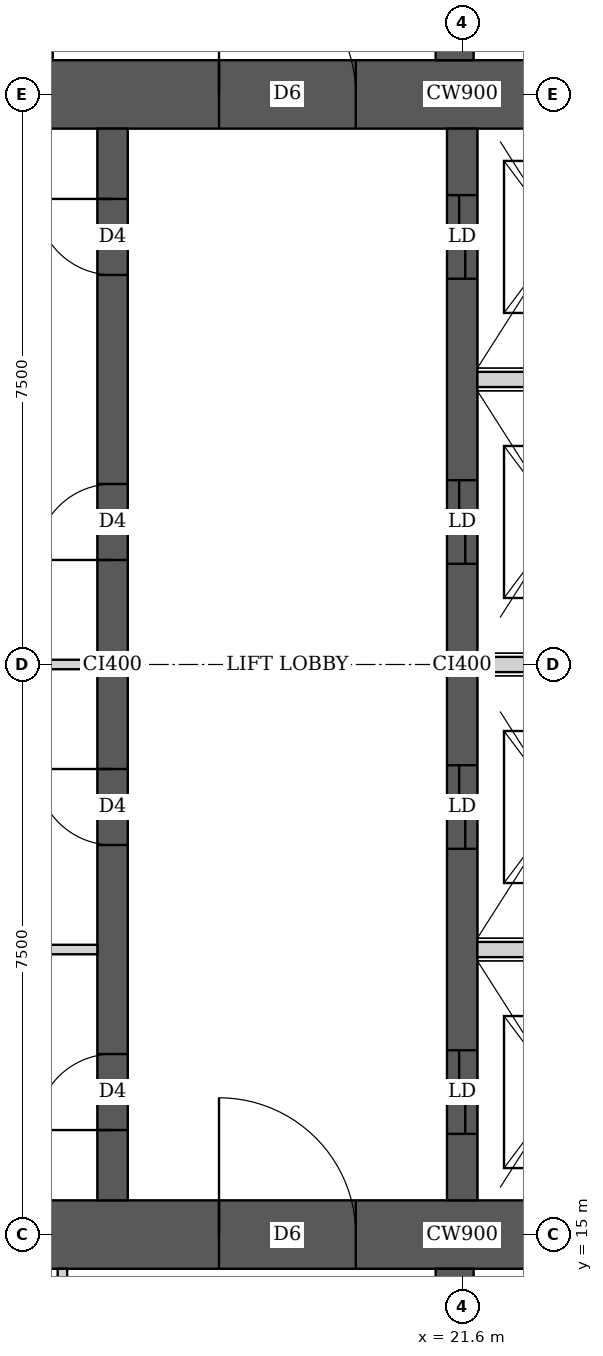
"""IFC4 building model, lengths in metres.
Left out: names, types, materials, properties, quantities, classifications, styles, units other than length and angle.
Written with IfcOpenShell. Run it as: python <this file> out.ifc"""

import sys

from ifc_helpers import new_model, si_unit, direction, frame, frame_2d, origin, place, context, subcontext, project, spatial, rectangle, extrude, element, fill, save


model = new_model("IFC4")
c1 = context("Model", 3, precision=1e-05, world=origin(), true_north=direction((0.0, 1.0)))
c2 = subcontext(c1, "Body", "Model", "MODEL_VIEW")
j1 = project(units=[si_unit("LENGTHUNIT", "METRE"), si_unit("PLANEANGLEUNIT", "RADIAN")], contexts=[c1])
p1 = place(None, origin())
s1 = spatial("IfcSite", under=j1, at=p1, CompositionType="ELEMENT")
p2 = place(p1, origin())
s2 = spatial("IfcBuilding", under=s1, at=p2, CompositionType="ELEMENT")
p3 = place(p2, frame((0.0, 0.0, 135.8)))
s3 = spatial("IfcBuildingStorey", under=s2, at=p3, CompositionType="ELEMENT", Elevation=135.8)
p4 = place(p3, frame((13.95, 15.0, 0.0), z_axis=(0.0, 0.0, 1.0), x_axis=(1.0, 0.0, 0.0)))
e1 = element("IfcWall", 1, at=p4, inside=s3, PredefinedType="SHEAR", context=c2, shape_type="SweptSolid", body=[
    extrude(rectangle(XDim=15.3, YDim=0.9, at=frame_2d((7.65, 0.0))), origin(), (0.0, 0.0, 1.0), 3.75),
])
p5 = place(p4, frame((4.45, 0.0, 0.0)))
e2 = element("IfcOpeningElement", 2, at=p5, cuts=e1, PredefinedType="OPENING", context=c2, shape_type="SweptSolid", body=[
    extrude(rectangle(XDim=1.8, YDim=2.1, at=frame_2d((0.9, 1.05))), frame((0.0, 0.46, 0.0), z_axis=(0.0, -1.0, 0.0), x_axis=(1.0, 0.0, 0.0)), (0.0, 0.0, 1.0), 0.92),
])
p6 = place(p4, frame((10.7, 0.0, 0.0)))
e3 = element("IfcOpeningElement", 3, at=p6, cuts=e1, PredefinedType="OPENING", context=c2, shape_type="SweptSolid", body=[
    extrude(rectangle(XDim=1.1, YDim=2.1, at=frame_2d((0.55, 1.05))), frame((0.0, 0.46, 0.0), z_axis=(0.0, -1.0, 0.0), x_axis=(1.0, 0.0, 0.0)), (0.0, 0.0, 1.0), 0.92),
])
p7 = place(p3, frame((13.95, 30.0, 0.0), z_axis=(0.0, 0.0, 1.0), x_axis=(1.0, 0.0, 0.0)))
e4 = element("IfcWall", 4, at=p7, inside=s3, PredefinedType="SHEAR", context=c2, shape_type="SweptSolid", body=[
    extrude(rectangle(XDim=15.3, YDim=0.9, at=frame_2d((7.65, 0.0))), origin(), (0.0, 0.0, 1.0), 3.75),
])
p8 = place(p7, frame((4.45, 0.0, 0.0)))
e5 = element("IfcOpeningElement", 5, at=p8, cuts=e4, PredefinedType="OPENING", context=c2, shape_type="SweptSolid", body=[
    extrude(rectangle(XDim=1.8, YDim=2.1, at=frame_2d((0.9, 1.05))), frame((0.0, 0.46, 0.0), z_axis=(0.0, -1.0, 0.0), x_axis=(1.0, 0.0, 0.0)), (0.0, 0.0, 1.0), 0.92),
])
p9 = place(p7, frame((10.7, 0.0, 0.0)))
e6 = element("IfcOpeningElement", 6, at=p9, cuts=e4, PredefinedType="OPENING", context=c2, shape_type="SweptSolid", body=[
    extrude(rectangle(XDim=1.1, YDim=2.1, at=frame_2d((0.55, 1.05))), frame((0.0, 0.46, 0.0), z_axis=(0.0, -1.0, 0.0), x_axis=(1.0, 0.0, 0.0)), (0.0, 0.0, 1.0), 0.92),
])
p10 = place(p3, frame((17.0, 15.45, 0.0), z_axis=(0.0, 0.0, 1.0), x_axis=(0.0, 1.0, 0.0)))
e7 = element("IfcWall", 7, at=p10, inside=s3, PredefinedType="SHEAR", context=c2, shape_type="SweptSolid", body=[
    extrude(rectangle(XDim=14.1, YDim=0.4, at=frame_2d((7.05, 0.0))), origin(), (0.0, 0.0, 1.0), 3.75),
])
p11 = place(p10, frame((0.925, 0.0, 0.0)))
e8 = element("IfcOpeningElement", 8, at=p11, cuts=e7, PredefinedType="OPENING", context=c2, shape_type="SweptSolid", body=[
    extrude(rectangle(XDim=1.0, YDim=2.1, at=frame_2d((0.5, 1.05))), frame((0.0, 0.21, 0.0), z_axis=(0.0, -1.0, 0.0), x_axis=(1.0, 0.0, 0.0)), (0.0, 0.0, 1.0), 0.42),
])
p12 = place(p10, frame((4.675, 0.0, 0.0)))
e9 = element("IfcOpeningElement", 9, at=p12, cuts=e7, PredefinedType="OPENING", context=c2, shape_type="SweptSolid", body=[
    extrude(rectangle(XDim=1.0, YDim=2.1, at=frame_2d((0.5, 1.05))), frame((0.0, 0.21, 0.0), z_axis=(0.0, -1.0, 0.0), x_axis=(1.0, 0.0, 0.0)), (0.0, 0.0, 1.0), 0.42),
])
p13 = place(p10, frame((8.425, 0.0, 0.0)))
e10 = element("IfcOpeningElement", 10, at=p13, cuts=e7, PredefinedType="OPENING", context=c2, shape_type="SweptSolid", body=[
    extrude(rectangle(XDim=1.0, YDim=2.1, at=frame_2d((0.5, 1.05))), frame((0.0, 0.21, 0.0), z_axis=(0.0, -1.0, 0.0), x_axis=(1.0, 0.0, 0.0)), (0.0, 0.0, 1.0), 0.42),
])
p14 = place(p10, frame((12.175, 0.0, 0.0)))
e11 = element("IfcOpeningElement", 11, at=p14, cuts=e7, PredefinedType="OPENING", context=c2, shape_type="SweptSolid", body=[
    extrude(rectangle(XDim=1.0, YDim=2.1, at=frame_2d((0.5, 1.05))), frame((0.0, 0.21, 0.0), z_axis=(0.0, -1.0, 0.0), x_axis=(1.0, 0.0, 0.0)), (0.0, 0.0, 1.0), 0.42),
])
p15 = place(p3, frame((21.6, 15.45, 0.0), z_axis=(0.0, 0.0, 1.0), x_axis=(0.0, 1.0, 0.0)))
e12 = element("IfcWall", 12, at=p15, inside=s3, PredefinedType="SHEAR", context=c2, shape_type="SweptSolid", body=[
    extrude(rectangle(XDim=14.1, YDim=0.4, at=frame_2d((7.05, 0.0))), origin(), (0.0, 0.0, 1.0), 3.75),
])
p16 = place(p15, frame((0.875, 0.0, 0.0)))
e13 = element("IfcOpeningElement", 13, at=p16, cuts=e12, PredefinedType="OPENING", context=c2, shape_type="SweptSolid", body=[
    extrude(rectangle(XDim=1.1, YDim=2.1, at=frame_2d((0.55, 1.05))), frame((0.0, 0.21, 0.0), z_axis=(0.0, -1.0, 0.0), x_axis=(1.0, 0.0, 0.0)), (0.0, 0.0, 1.0), 0.42),
])
p17 = place(p15, frame((4.625, 0.0, 0.0)))
e14 = element("IfcOpeningElement", 14, at=p17, cuts=e12, PredefinedType="OPENING", context=c2, shape_type="SweptSolid", body=[
    extrude(rectangle(XDim=1.1, YDim=2.1, at=frame_2d((0.55, 1.05))), frame((0.0, 0.21, 0.0), z_axis=(0.0, -1.0, 0.0), x_axis=(1.0, 0.0, 0.0)), (0.0, 0.0, 1.0), 0.42),
])
p18 = place(p15, frame((8.375, 0.0, 0.0)))
e15 = element("IfcOpeningElement", 15, at=p18, cuts=e12, PredefinedType="OPENING", context=c2, shape_type="SweptSolid", body=[
    extrude(rectangle(XDim=1.1, YDim=2.1, at=frame_2d((0.55, 1.05))), frame((0.0, 0.21, 0.0), z_axis=(0.0, -1.0, 0.0), x_axis=(1.0, 0.0, 0.0)), (0.0, 0.0, 1.0), 0.42),
])
p19 = place(p15, frame((12.125, 0.0, 0.0)))
e16 = element("IfcOpeningElement", 16, at=p19, cuts=e12, PredefinedType="OPENING", context=c2, shape_type="SweptSolid", body=[
    extrude(rectangle(XDim=1.1, YDim=2.1, at=frame_2d((0.55, 1.05))), frame((0.0, 0.21, 0.0), z_axis=(0.0, -1.0, 0.0), x_axis=(1.0, 0.0, 0.0)), (0.0, 0.0, 1.0), 0.42),
])
for number, where, z_axis, x_axis in (
    (17, (21.5, 10.35, 0.0), (0.0, 0.0, 1.0), (0.0, 1.0, 0.0)),
    (18, (21.5, 30.45, 0.0), (0.0, 0.0, 1.0), (0.0, 1.0, 0.0)),
):
    element("IfcWall", number, at=place(p3, frame(where, z_axis=z_axis, x_axis=x_axis)), inside=s3, PredefinedType="SHEAR", context=c2, shape_type="SweptSolid", body=[
        extrude(rectangle(XDim=4.2, YDim=0.5, at=frame_2d((2.1, 0.0))), origin(), (0.0, 0.0, 1.0), 3.75),
    ])
p20 = place(p3, frame((16.34, 10.413, 0.0), z_axis=(0.0, 0.0, 1.0), x_axis=(0.0, 1.0, 0.0)))
e19 = element("IfcWall", 19, at=p20, inside=s3, PredefinedType="PARTITIONING", context=c2, shape_type="SweptSolid", body=[
    extrude(rectangle(XDim=4.137, YDim=0.125, at=frame_2d((2.068, 0.0))), origin(), (0.0, 0.0, 1.0), 3.5),
])
p21 = place(p20, frame((1.512, 0.0, 0.0)))
e20 = element("IfcOpeningElement", 20, at=p21, cuts=e19, PredefinedType="OPENING", context=c2, shape_type="SweptSolid", body=[
    extrude(rectangle(XDim=1.0, YDim=2.1, at=frame_2d((0.5, 1.05))), frame((0.0, 0.073, 0.0), z_axis=(0.0, -1.0, 0.0), x_axis=(1.0, 0.0, 0.0)), (0.0, 0.0, 1.0), 0.145),
])
p22 = place(p3, frame((16.15, 30.45, 0.0), z_axis=(0.0, 0.0, 1.0), x_axis=(0.0, 1.0, 0.0)))
e21 = element("IfcWall", 21, at=p22, inside=s3, PredefinedType="PARTITIONING", context=c2, shape_type="SweptSolid", body=[
    extrude(rectangle(XDim=4.137, YDim=0.125, at=frame_2d((2.068, 0.0))), origin(), (0.0, 0.0, 1.0), 3.5),
])
p23 = place(p22, frame((1.625, 0.0, 0.0)))
e22 = element("IfcOpeningElement", 22, at=p23, cuts=e21, PredefinedType="OPENING", context=c2, shape_type="SweptSolid", body=[
    extrude(rectangle(XDim=1.0, YDim=2.1, at=frame_2d((0.5, 1.05))), frame((0.0, 0.073, 0.0), z_axis=(0.0, -1.0, 0.0), x_axis=(1.0, 0.0, 0.0)), (0.0, 0.0, 1.0), 0.145),
])
for number, where, z_axis, x_axis in (
    (23, (14.85, 18.75, 0.0), (0.0, 0.0, 1.0), (1.0, 0.0, 0.0)),
    (24, (14.85, 22.5, 0.0), (0.0, 0.0, 1.0), (1.0, 0.0, 0.0)),
):
    element("IfcWall", number, at=place(p3, frame(where, z_axis=z_axis, x_axis=x_axis)), inside=s3, PredefinedType="PARTITIONING", context=c2, shape_type="SweptSolid", body=[
        extrude(rectangle(XDim=1.95, YDim=0.125, at=frame_2d((0.975, 0.0))), origin(), (0.0, 0.0, 1.0), 3.5),
    ])
for number, where, z_axis, x_axis in (
    (25, (21.8, 18.75, 0.0), (0.0, 0.0, 1.0), (1.0, 0.0, 0.0)),
    (26, (21.8, 22.5, 0.0), (0.0, 0.0, 1.0), (1.0, 0.0, 0.0)),
    (27, (21.8, 26.25, 0.0), (0.0, 0.0, 1.0), (1.0, 0.0, 0.0)),
):
    element("IfcWall", number, at=place(p3, frame(where, z_axis=z_axis, x_axis=x_axis)), inside=s3, PredefinedType="SOLIDWALL", context=c2, shape_type="SweptSolid", body=[
        extrude(rectangle(XDim=2.2, YDim=0.2, at=frame_2d((1.1, 0.0))), origin(), (0.0, 0.0, 1.0), 3.5),
    ])
p24 = place(p11, origin())
e28 = element("IfcDoor", 28, at=p24, inside=s3, OperationType="SINGLE_SWING_LEFT", PredefinedType="DOOR", context=c2, shape_type="SweptSolid", body=[
    extrude(rectangle(XDim=1.0, YDim=2.1, at=frame_2d((0.5, 1.05))), frame((0.0, 0.025, 0.0), z_axis=(0.0, -1.0, 0.0), x_axis=(1.0, 0.0, 0.0)), (0.0, 0.0, 1.0), 0.05),
])
fill(e8, e28)
p25 = place(p12, origin())
e29 = element("IfcDoor", 29, at=p25, inside=s3, OperationType="SINGLE_SWING_RIGHT", PredefinedType="DOOR", context=c2, shape_type="SweptSolid", body=[
    extrude(rectangle(XDim=1.0, YDim=2.1, at=frame_2d((0.5, 1.05))), frame((0.0, 0.025, 0.0), z_axis=(0.0, -1.0, 0.0), x_axis=(1.0, 0.0, 0.0)), (0.0, 0.0, 1.0), 0.05),
])
fill(e9, e29)
p26 = place(p13, origin())
e30 = element("IfcDoor", 30, at=p26, inside=s3, OperationType="SINGLE_SWING_LEFT", PredefinedType="DOOR", context=c2, shape_type="SweptSolid", body=[
    extrude(rectangle(XDim=1.0, YDim=2.1, at=frame_2d((0.5, 1.05))), frame((0.0, 0.025, 0.0), z_axis=(0.0, -1.0, 0.0), x_axis=(1.0, 0.0, 0.0)), (0.0, 0.0, 1.0), 0.05),
])
fill(e10, e30)
p27 = place(p14, origin())
e31 = element("IfcDoor", 31, at=p27, inside=s3, OperationType="SINGLE_SWING_RIGHT", PredefinedType="DOOR", context=c2, shape_type="SweptSolid", body=[
    extrude(rectangle(XDim=1.0, YDim=2.1, at=frame_2d((0.5, 1.05))), frame((0.0, 0.025, 0.0), z_axis=(0.0, -1.0, 0.0), x_axis=(1.0, 0.0, 0.0)), (0.0, 0.0, 1.0), 0.05),
])
fill(e11, e31)
p28 = place(p5, origin())
e32 = element("IfcDoor", 32, at=p28, inside=s3, OperationType="DOUBLE_DOOR_SINGLE_SWING", PredefinedType="DOOR", context=c2, shape_type="SweptSolid", body=[
    extrude(rectangle(XDim=1.8, YDim=2.1, at=frame_2d((0.9, 1.05))), frame((0.0, 0.025, 0.0), z_axis=(0.0, -1.0, 0.0), x_axis=(1.0, 0.0, 0.0)), (0.0, 0.0, 1.0), 0.05),
])
fill(e2, e32)
p29 = place(p8, origin())
e33 = element("IfcDoor", 33, at=p29, inside=s3, OperationType="DOUBLE_DOOR_SINGLE_SWING", PredefinedType="DOOR", context=c2, shape_type="SweptSolid", body=[
    extrude(rectangle(XDim=1.8, YDim=2.1, at=frame_2d((0.9, 1.05))), frame((0.0, 0.025, 0.0), z_axis=(0.0, -1.0, 0.0), x_axis=(1.0, 0.0, 0.0)), (0.0, 0.0, 1.0), 0.05),
])
fill(e5, e33)
p30 = place(p16, origin())
e34 = element("IfcDoor", 34, at=p30, inside=s3, OperationType="DOUBLE_DOOR_SLIDING", PredefinedType="DOOR", context=c2, shape_type="SweptSolid", body=[
    extrude(rectangle(XDim=1.1, YDim=2.1, at=frame_2d((0.55, 1.05))), frame((0.0, 0.025, 0.0), z_axis=(0.0, -1.0, 0.0), x_axis=(1.0, 0.0, 0.0)), (0.0, 0.0, 1.0), 0.05),
])
fill(e13, e34)
p31 = place(p17, origin())
e35 = element("IfcDoor", 35, at=p31, inside=s3, OperationType="DOUBLE_DOOR_SLIDING", PredefinedType="DOOR", context=c2, shape_type="SweptSolid", body=[
    extrude(rectangle(XDim=1.1, YDim=2.1, at=frame_2d((0.55, 1.05))), frame((0.0, 0.025, 0.0), z_axis=(0.0, -1.0, 0.0), x_axis=(1.0, 0.0, 0.0)), (0.0, 0.0, 1.0), 0.05),
])
fill(e14, e35)
p32 = place(p18, origin())
e36 = element("IfcDoor", 36, at=p32, inside=s3, OperationType="DOUBLE_DOOR_SLIDING", PredefinedType="DOOR", context=c2, shape_type="SweptSolid", body=[
    extrude(rectangle(XDim=1.1, YDim=2.1, at=frame_2d((0.55, 1.05))), frame((0.0, 0.025, 0.0), z_axis=(0.0, -1.0, 0.0), x_axis=(1.0, 0.0, 0.0)), (0.0, 0.0, 1.0), 0.05),
])
fill(e15, e36)
p33 = place(p19, origin())
e37 = element("IfcDoor", 37, at=p33, inside=s3, OperationType="DOUBLE_DOOR_SLIDING", PredefinedType="DOOR", context=c2, shape_type="SweptSolid", body=[
    extrude(rectangle(XDim=1.1, YDim=2.1, at=frame_2d((0.55, 1.05))), frame((0.0, 0.025, 0.0), z_axis=(0.0, -1.0, 0.0), x_axis=(1.0, 0.0, 0.0)), (0.0, 0.0, 1.0), 0.05),
])
fill(e16, e37)
save(model, sys.argv[1])
